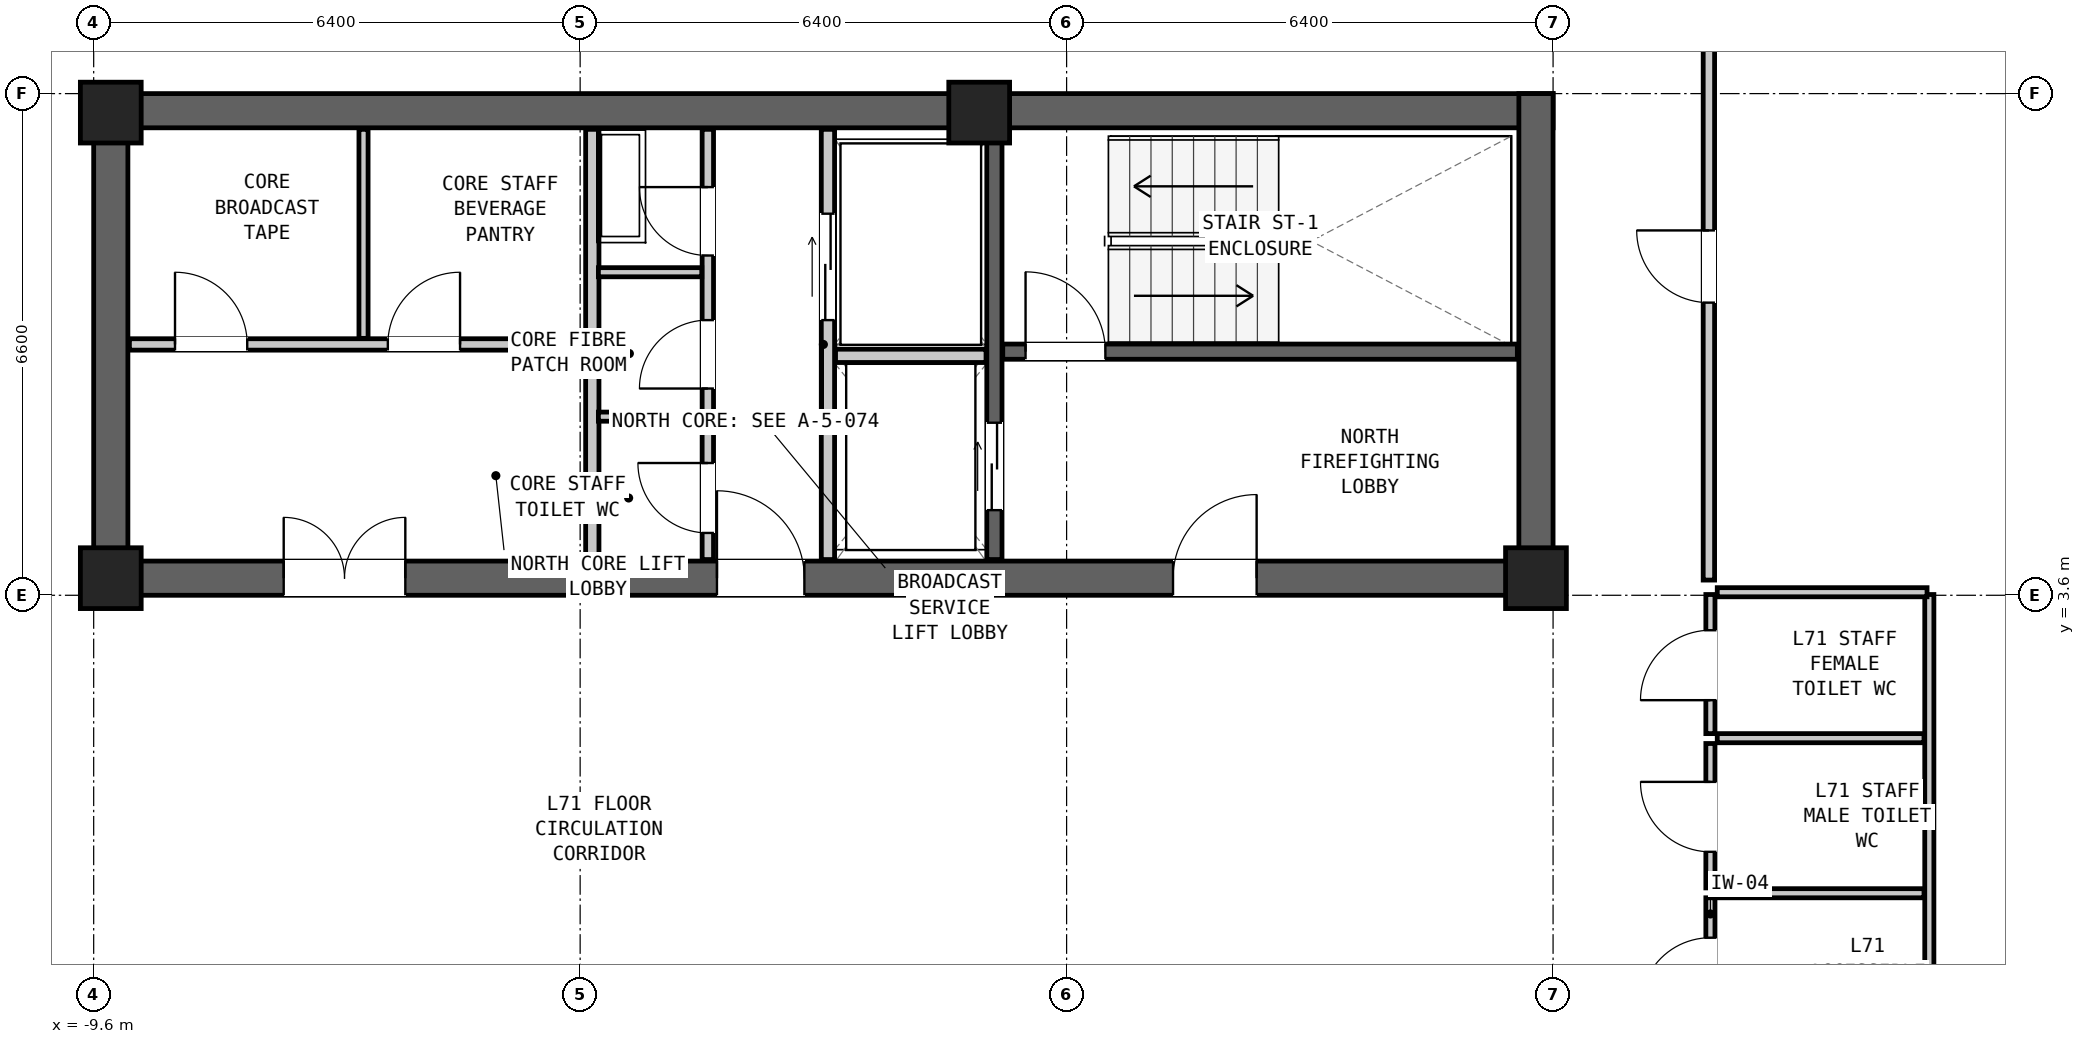
"""IFC4 building model, lengths in metres.
Left out: names, types, materials, properties, quantities, classifications, styles, units other than length and angle.
Written with IfcOpenShell. Run it as: python <this file> out.ifc"""

import sys

from ifc_helpers import new_model, si_unit, direction, frame, frame_2d, origin, origin_2d, place, context, subcontext, project, spatial, rectangle, extrude, element, fill, save


model = new_model("IFC4")
c1 = context("Model", 3, precision=1e-05, world=origin(), true_north=direction((0.0, 1.0)))
c2 = subcontext(c1, "Body", "Model", "MODEL_VIEW")
j1 = project(units=[si_unit("LENGTHUNIT", "METRE"), si_unit("PLANEANGLEUNIT", "RADIAN")], contexts=[c1])
p1 = place(None, origin())
s1 = spatial("IfcSite", under=j1, at=p1, CompositionType="ELEMENT")
p2 = place(p1, origin())
s2 = spatial("IfcBuilding", under=s1, at=p2, CompositionType="ELEMENT")
p3 = place(p2, frame((0.0, 0.0, 242.85)))
s3 = spatial("IfcBuildingStorey", under=s2, at=p3, CompositionType="ELEMENT", Elevation=242.85)
p4 = place(p3, frame((-9.6, 9.975, 0.0), z_axis=(0.0, 0.0, 1.0), x_axis=(1.0, 0.0, 0.0)))
e1 = element("IfcWall", 1, at=p4, inside=s3, PredefinedType="SHEAR", context=c2, shape_type="SweptSolid", body=[
    extrude(rectangle(XDim=19.2, YDim=0.45, at=frame_2d((9.6, 0.0))), origin(), (0.0, 0.0, 1.0), 3.05),
])
p5 = place(p3, frame((-9.6, 3.825, 0.0), z_axis=(0.0, 0.0, 1.0), x_axis=(1.0, 0.0, 0.0)))
e2 = element("IfcWall", 2, at=p5, inside=s3, PredefinedType="SHEAR", context=c2, shape_type="SweptSolid", body=[
    extrude(rectangle(XDim=19.2, YDim=0.45, at=frame_2d((9.6, 0.0))), origin(), (0.0, 0.0, 1.0), 3.05),
])
p6 = place(p5, frame((14.2, 0.0, 0.0)))
e3 = element("IfcOpeningElement", 3, at=p6, cuts=e2, PredefinedType="OPENING", context=c2, shape_type="SweptSolid", body=[
    extrude(rectangle(XDim=1.1, YDim=2.08, at=frame_2d((0.55, 1.04))), frame((0.0, 0.237, 0.0), z_axis=(0.0, -1.0, 0.0), x_axis=(1.0, 0.0, 0.0)), (0.0, 0.0, 1.0), 0.474),
])
p7 = place(p5, frame((8.2, 0.0, 0.0)))
e4 = element("IfcOpeningElement", 4, at=p7, cuts=e2, PredefinedType="OPENING", context=c2, shape_type="SweptSolid", body=[
    extrude(rectangle(XDim=1.15, YDim=2.1, at=frame_2d((0.575, 1.05))), frame((0.0, 0.237, 0.0), z_axis=(0.0, -1.0, 0.0), x_axis=(1.0, 0.0, 0.0)), (0.0, 0.0, 1.0), 0.474),
])
p8 = place(p5, frame((2.5, 0.0, 0.0)))
e5 = element("IfcOpeningElement", 5, at=p8, cuts=e2, PredefinedType="OPENING", context=c2, shape_type="SweptSolid", body=[
    extrude(rectangle(XDim=1.6, YDim=2.12, at=frame_2d((0.8, 1.06))), frame((0.0, 0.237, 0.0), z_axis=(0.0, -1.0, 0.0), x_axis=(1.0, 0.0, 0.0)), (0.0, 0.0, 1.0), 0.474),
])
for number, where, z_axis, x_axis in (
    (6, (-9.375, 3.6, 0.0), (0.0, 0.0, 1.0), (0.0, 1.0, 0.0)),
    (7, (9.375, 3.6, 0.0), (0.0, 0.0, 1.0), (0.0, 1.0, 0.0)),
):
    element("IfcWall", number, at=place(p3, frame(where, z_axis=z_axis, x_axis=x_axis)), inside=s3, PredefinedType="SHEAR", context=c2, shape_type="SweptSolid", body=[
        extrude(rectangle(XDim=6.6, YDim=0.45, at=frame_2d((3.3, 0.0))), origin(), (0.0, 0.0, 1.0), 3.05),
    ])
for number, where, z_axis, x_axis in (
    (8, (-9.375, 9.95, 0.0), (0.0, 0.0, 1.0), (1.0, 0.0, 0.0)),
    (9, (2.05, 9.95, 0.0), (0.0, 0.0, 1.0), (1.0, 0.0, 0.0)),
    (10, (-9.375, 3.825, 0.0), (0.0, 0.0, 1.0), (1.0, 0.0, 0.0)),
    (11, (9.375, 3.825, 0.0), (0.0, 0.0, 1.0), (1.0, 0.0, 0.0)),
):
    element("IfcColumn", number, at=place(p3, frame(where, z_axis=z_axis, x_axis=x_axis)), inside=s3, PredefinedType="COLUMN", context=c2, shape_type="SweptSolid", body=[
        extrude(rectangle(XDim=0.8, YDim=0.8, at=origin_2d()), origin(), (0.0, 0.0, 1.0), 3.05),
    ])
p9 = place(p3, frame((2.36, 6.805, 0.0), z_axis=(0.0, 0.0, 1.0), x_axis=(1.0, 0.0, 0.0)))
e12 = element("IfcWall", 12, at=p9, inside=s3, PredefinedType="SHEAR", context=c2, shape_type="SweptSolid", body=[
    extrude(rectangle(XDim=6.77, YDim=0.2, at=frame_2d((3.385, 0.0))), origin(), (0.0, 0.0, 1.0), 2.86),
])
p10 = place(p9, frame((0.3, 0.0, 0.0)))
e13 = element("IfcOpeningElement", 13, at=p10, cuts=e12, PredefinedType="OPENING", context=c2, shape_type="SweptSolid", body=[
    extrude(rectangle(XDim=1.05, YDim=2.08, at=frame_2d((0.525, 1.04))), frame((0.0, 0.112, 0.0), z_axis=(0.0, -1.0, 0.0), x_axis=(1.0, 0.0, 0.0)), (0.0, 0.0, 1.0), 0.224),
])
p11 = place(p3, frame((2.25, 4.07, 0.0), z_axis=(0.0, 0.0, 1.0), x_axis=(0.0, 1.0, 0.0)))
e14 = element("IfcWall", 14, at=p11, inside=s3, PredefinedType="SHEAR", context=c2, shape_type="SweptSolid", body=[
    extrude(rectangle(XDim=5.66, YDim=0.2, at=frame_2d((2.83, 0.0))), origin(), (0.0, 0.0, 1.0), 2.86),
])
p12 = place(p11, frame((0.65, 0.0, 0.0)))
e15 = element("IfcOpeningElement", 15, at=p12, cuts=e14, PredefinedType="OPENING", context=c2, shape_type="SweptSolid", body=[
    extrude(rectangle(XDim=1.15, YDim=2.08, at=frame_2d((0.575, 1.04))), frame((0.0, 0.112, 0.0), z_axis=(0.0, -1.0, 0.0), x_axis=(1.0, 0.0, 0.0)), (0.0, 0.0, 1.0), 0.224),
])
p13 = place(p3, frame((0.06, 4.07, 0.0), z_axis=(0.0, 0.0, 1.0), x_axis=(0.0, 1.0, 0.0)))
e16 = element("IfcWall", 16, at=p13, inside=s3, PredefinedType="PARTITIONING", context=c2, shape_type="SweptSolid", body=[
    extrude(rectangle(XDim=5.66, YDim=0.175, at=frame_2d((2.83, 0.0))), origin(), (0.0, 0.0, 1.0), 2.86),
])
p14 = place(p13, frame((3.15, 0.0, 0.0)))
e17 = element("IfcOpeningElement", 17, at=p14, cuts=e16, PredefinedType="OPENING", context=c2, shape_type="SweptSolid", body=[
    extrude(rectangle(XDim=1.4, YDim=2.12, at=frame_2d((0.7, 1.06))), frame((0.0, 0.1, 0.0), z_axis=(0.0, -1.0, 0.0), x_axis=(1.0, 0.0, 0.0)), (0.0, 0.0, 1.0), 0.199),
])
p15 = place(p3, frame((0.16, 6.75, 0.0), z_axis=(0.0, 0.0, 1.0), x_axis=(1.0, 0.0, 0.0)))
e18 = element("IfcWall", 18, at=p15, inside=s3, PredefinedType="PARTITIONING", context=c2, shape_type="SweptSolid", body=[
    extrude(rectangle(XDim=1.98, YDim=0.175, at=frame_2d((0.99, 0.0))), origin(), (0.0, 0.0, 1.0), 2.86),
])
p16 = place(p3, frame((-3.04, 4.07, 0.0), z_axis=(0.0, 0.0, 1.0), x_axis=(0.0, 1.0, 0.0)))
e19 = element("IfcWall", 19, at=p16, inside=s3, PredefinedType="PARTITIONING", context=c2, shape_type="SweptSolid", body=[
    extrude(rectangle(XDim=5.66, YDim=0.175, at=frame_2d((2.83, 0.0))), origin(), (0.0, 0.0, 1.0), 2.86),
])
p17 = place(p3, frame((-1.52, 4.07, 0.0), z_axis=(0.0, 0.0, 1.0), x_axis=(0.0, 1.0, 0.0)))
e20 = element("IfcWall", 20, at=p17, inside=s3, PredefinedType="PARTITIONING", context=c2, shape_type="SweptSolid", body=[
    extrude(rectangle(XDim=5.66, YDim=0.15, at=frame_2d((2.83, 0.0))), origin(), (0.0, 0.0, 1.0), 2.86),
])
p18 = place(p17, frame((4.0, 0.0, 0.0)))
e21 = element("IfcOpeningElement", 21, at=p18, cuts=e20, PredefinedType="OPENING", context=c2, shape_type="SweptSolid", body=[
    extrude(rectangle(XDim=0.9, YDim=2.05, at=frame_2d((0.45, 1.025))), frame((0.0, 0.087, 0.0), z_axis=(0.0, -1.0, 0.0), x_axis=(1.0, 0.0, 0.0)), (0.0, 0.0, 1.0), 0.174),
])
p19 = place(p17, frame((2.25, 0.0, 0.0)))
e22 = element("IfcOpeningElement", 22, at=p19, cuts=e20, PredefinedType="OPENING", context=c2, shape_type="SweptSolid", body=[
    extrude(rectangle(XDim=0.9, YDim=2.05, at=frame_2d((0.45, 1.025))), frame((0.0, 0.087, 0.0), z_axis=(0.0, -1.0, 0.0), x_axis=(1.0, 0.0, 0.0)), (0.0, 0.0, 1.0), 0.174),
])
p20 = place(p17, frame((0.35, 0.0, 0.0)))
e23 = element("IfcOpeningElement", 23, at=p20, cuts=e20, PredefinedType="OPENING", context=c2, shape_type="SweptSolid", body=[
    extrude(rectangle(XDim=0.92, YDim=2.1, at=frame_2d((0.46, 1.05))), frame((0.0, 0.087, 0.0), z_axis=(0.0, -1.0, 0.0), x_axis=(1.0, 0.0, 0.0)), (0.0, 0.0, 1.0), 0.174),
])
for number, where, z_axis, x_axis in (
    (24, (-2.96, 5.95, 0.0), (0.0, 0.0, 1.0), (1.0, 0.0, 0.0)),
    (25, (-2.96, 7.85, 0.0), (0.0, 0.0, 1.0), (1.0, 0.0, 0.0)),
):
    element("IfcWall", number, at=place(p3, frame(where, z_axis=z_axis, x_axis=x_axis)), inside=s3, PredefinedType="PARTITIONING", context=c2, shape_type="SweptSolid", body=[
        extrude(rectangle(XDim=1.36, YDim=0.12, at=frame_2d((0.68, 0.0))), origin(), (0.0, 0.0, 1.0), 2.86),
    ])
p21 = place(p3, frame((-9.13, 6.9, 0.0), z_axis=(0.0, 0.0, 1.0), x_axis=(1.0, 0.0, 0.0)))
e26 = element("IfcWall", 26, at=p21, inside=s3, PredefinedType="PARTITIONING", context=c2, shape_type="SweptSolid", body=[
    extrude(rectangle(XDim=6.01, YDim=0.15, at=frame_2d((3.005, 0.0))), origin(), (0.0, 0.0, 1.0), 2.86),
])
p22 = place(p21, frame((0.6, 0.0, 0.0)))
e27 = element("IfcOpeningElement", 27, at=p22, cuts=e26, PredefinedType="OPENING", context=c2, shape_type="SweptSolid", body=[
    extrude(rectangle(XDim=0.95, YDim=2.1, at=frame_2d((0.475, 1.05))), frame((0.0, 0.087, 0.0), z_axis=(0.0, -1.0, 0.0), x_axis=(1.0, 0.0, 0.0)), (0.0, 0.0, 1.0), 0.174),
])
p23 = place(p21, frame((3.4, 0.0, 0.0)))
e28 = element("IfcOpeningElement", 28, at=p23, cuts=e26, PredefinedType="OPENING", context=c2, shape_type="SweptSolid", body=[
    extrude(rectangle(XDim=0.95, YDim=2.1, at=frame_2d((0.475, 1.05))), frame((0.0, 0.087, 0.0), z_axis=(0.0, -1.0, 0.0), x_axis=(1.0, 0.0, 0.0)), (0.0, 0.0, 1.0), 0.174),
])
p24 = place(p3, frame((-6.05, 6.98, 0.0), z_axis=(0.0, 0.0, 1.0), x_axis=(0.0, 1.0, 0.0)))
e29 = element("IfcWall", 29, at=p24, inside=s3, PredefinedType="PARTITIONING", context=c2, shape_type="SweptSolid", body=[
    extrude(rectangle(XDim=2.75, YDim=0.12, at=frame_2d((1.375, 0.0))), origin(), (0.0, 0.0, 1.0), 2.86),
])
p25 = place(p3, frame((11.67, -2.32, 0.0), z_axis=(0.0, 0.0, 1.0), x_axis=(0.0, 1.0, 0.0)))
e30 = element("IfcWall", 30, at=p25, inside=s3, PredefinedType="PARTITIONING", context=c2, shape_type="SweptSolid", body=[
    extrude(rectangle(XDim=1.94, YDim=0.12, at=frame_2d((0.97, 0.0))), origin(), (0.0, 0.0, 1.0), 2.86),
])
p26 = place(p25, frame((0.495, 0.0, 0.0)))
e31 = element("IfcOpeningElement", 31, at=p26, cuts=e30, PredefinedType="OPENING", context=c2, shape_type="SweptSolid", body=[
    extrude(rectangle(XDim=0.92, YDim=2.1, at=frame_2d((0.46, 1.05))), frame((0.0, 0.072, 0.0), z_axis=(0.0, -1.0, 0.0), x_axis=(1.0, 0.0, 0.0)), (0.0, 0.0, 1.0), 0.144),
])
p27 = place(p3, frame((11.67, -0.25, 0.0), z_axis=(0.0, 0.0, 1.0), x_axis=(0.0, 1.0, 0.0)))
e32 = element("IfcWall", 32, at=p27, inside=s3, PredefinedType="PARTITIONING", context=c2, shape_type="SweptSolid", body=[
    extrude(rectangle(XDim=1.9, YDim=0.12, at=frame_2d((0.95, 0.0))), origin(), (0.0, 0.0, 1.0), 2.86),
])
p28 = place(p27, frame((0.475, 0.0, 0.0)))
e33 = element("IfcOpeningElement", 33, at=p28, cuts=e32, PredefinedType="OPENING", context=c2, shape_type="SweptSolid", body=[
    extrude(rectangle(XDim=0.92, YDim=2.1, at=frame_2d((0.46, 1.05))), frame((0.0, 0.072, 0.0), z_axis=(0.0, -1.0, 0.0), x_axis=(1.0, 0.0, 0.0)), (0.0, 0.0, 1.0), 0.144),
])
p29 = place(p3, frame((11.67, 1.78, 0.0), z_axis=(0.0, 0.0, 1.0), x_axis=(0.0, 1.0, 0.0)))
e34 = element("IfcWall", 34, at=p29, inside=s3, PredefinedType="PARTITIONING", context=c2, shape_type="SweptSolid", body=[
    extrude(rectangle(XDim=1.83, YDim=0.12, at=frame_2d((0.915, 0.0))), origin(), (0.0, 0.0, 1.0), 2.86),
])
p30 = place(p29, frame((0.44, 0.0, 0.0)))
e35 = element("IfcOpeningElement", 35, at=p30, cuts=e34, PredefinedType="OPENING", context=c2, shape_type="SweptSolid", body=[
    extrude(rectangle(XDim=0.92, YDim=2.1, at=frame_2d((0.46, 1.05))), frame((0.0, 0.072, 0.0), z_axis=(0.0, -1.0, 0.0), x_axis=(1.0, 0.0, 0.0)), (0.0, 0.0, 1.0), 0.144),
])
p31 = place(p3, frame((14.55, -2.32, 0.0), z_axis=(0.0, 0.0, 1.0), x_axis=(0.0, 1.0, 0.0)))
e36 = element("IfcWall", 36, at=p31, inside=s3, PredefinedType="PARTITIONING", context=c2, shape_type="SweptSolid", body=[
    extrude(rectangle(XDim=5.93, YDim=0.12, at=frame_2d((2.965, 0.0))), origin(), (0.0, 0.0, 1.0), 2.86),
])
p32 = place(p3, frame((11.76, 3.64, 0.0), z_axis=(0.0, 0.0, 1.0), x_axis=(1.0, 0.0, 0.0)))
e37 = element("IfcWall", 37, at=p32, inside=s3, PredefinedType="PARTITIONING", context=c2, shape_type="SweptSolid", body=[
    extrude(rectangle(XDim=2.76, YDim=0.12, at=frame_2d((1.38, 0.0))), origin(), (0.0, 0.0, 1.0), 1.722),
])
for number, where, z_axis, x_axis in (
    (38, (11.76, -0.32, 0.0), (0.0, 0.0, 1.0), (1.0, 0.0, 0.0)),
    (39, (11.76, 1.72, 0.0), (0.0, 0.0, 1.0), (1.0, 0.0, 0.0)),
):
    element("IfcWall", number, at=place(p3, frame(where, z_axis=z_axis, x_axis=x_axis)), inside=s3, PredefinedType="PARTITIONING", context=c2, shape_type="SweptSolid", body=[
        extrude(rectangle(XDim=2.72, YDim=0.12, at=frame_2d((1.36, 0.0))), origin(), (0.0, 0.0, 1.0), 2.86),
    ])
p33 = place(p3, frame((11.65, 3.8, 0.0), z_axis=(0.0, 0.0, 1.0), x_axis=(0.0, 1.0, 0.0)))
e40 = element("IfcWall", 40, at=p33, inside=s3, PredefinedType="PARTITIONING", context=c2, shape_type="SweptSolid", body=[
    extrude(rectangle(XDim=8.25, YDim=0.15, at=frame_2d((4.125, 0.0))), origin(), (0.0, 0.0, 1.0), 2.86),
])
p34 = place(p33, frame((3.65, 0.0, 0.0)))
e41 = element("IfcOpeningElement", 41, at=p34, cuts=e40, PredefinedType="OPENING", context=c2, shape_type="SweptSolid", body=[
    extrude(rectangle(XDim=0.95, YDim=2.1, at=frame_2d((0.475, 1.05))), frame((0.0, 0.087, 0.0), z_axis=(0.0, -1.0, 0.0), x_axis=(1.0, 0.0, 0.0)), (0.0, 0.0, 1.0), 0.174),
])
p35 = place(p10, origin())
e42 = element("IfcDoor", 42, at=p35, inside=s3, OperationType="SINGLE_SWING_LEFT", PredefinedType="DOOR", context=c2, shape_type="SweptSolid", body=[
    extrude(rectangle(XDim=1.05, YDim=2.08, at=frame_2d((0.525, 1.04))), frame((0.0, 0.025, 0.0), z_axis=(0.0, -1.0, 0.0), x_axis=(1.0, 0.0, 0.0)), (0.0, 0.0, 1.0), 0.05),
])
fill(e13, e42)
p36 = place(p6, origin())
e43 = element("IfcDoor", 43, at=p36, inside=s3, OperationType="SINGLE_SWING_RIGHT", PredefinedType="DOOR", context=c2, shape_type="SweptSolid", body=[
    extrude(rectangle(XDim=1.1, YDim=2.08, at=frame_2d((0.55, 1.04))), frame((0.0, 0.025, 0.0), z_axis=(0.0, -1.0, 0.0), x_axis=(1.0, 0.0, 0.0)), (0.0, 0.0, 1.0), 0.05),
])
fill(e3, e43)
p37 = place(p12, origin())
e44 = element("IfcDoor", 44, at=p37, inside=s3, OperationType="DOUBLE_DOOR_SLIDING", PredefinedType="DOOR", context=c2, shape_type="SweptSolid", body=[
    extrude(rectangle(XDim=1.15, YDim=2.08, at=frame_2d((0.575, 1.04))), frame((0.0, 0.025, 0.0), z_axis=(0.0, -1.0, 0.0), x_axis=(1.0, 0.0, 0.0)), (0.0, 0.0, 1.0), 0.05),
])
fill(e15, e44)
p38 = place(p14, origin())
e45 = element("IfcDoor", 45, at=p38, inside=s3, OperationType="DOUBLE_DOOR_SLIDING", PredefinedType="DOOR", context=c2, shape_type="SweptSolid", body=[
    extrude(rectangle(XDim=1.4, YDim=2.12, at=frame_2d((0.7, 1.06))), frame((0.0, 0.025, 0.0), z_axis=(0.0, -1.0, 0.0), x_axis=(1.0, 0.0, 0.0)), (0.0, 0.0, 1.0), 0.05),
])
fill(e17, e45)
p39 = place(p7, origin())
e46 = element("IfcDoor", 46, at=p39, inside=s3, OperationType="SINGLE_SWING_LEFT", PredefinedType="DOOR", context=c2, shape_type="SweptSolid", body=[
    extrude(rectangle(XDim=1.15, YDim=2.1, at=frame_2d((0.575, 1.05))), frame((0.0, 0.025, 0.0), z_axis=(0.0, -1.0, 0.0), x_axis=(1.0, 0.0, 0.0)), (0.0, 0.0, 1.0), 0.05),
])
fill(e4, e46)
p40 = place(p18, origin())
e47 = element("IfcDoor", 47, at=p40, inside=s3, OperationType="SINGLE_SWING_RIGHT", PredefinedType="DOOR", context=c2, shape_type="SweptSolid", body=[
    extrude(rectangle(XDim=0.9, YDim=2.05, at=frame_2d((0.45, 1.025))), frame((0.0, 0.025, 0.0), z_axis=(0.0, -1.0, 0.0), x_axis=(1.0, 0.0, 0.0)), (0.0, 0.0, 1.0), 0.05),
])
fill(e21, e47)
p41 = place(p19, origin())
e48 = element("IfcDoor", 48, at=p41, inside=s3, OperationType="SINGLE_SWING_LEFT", PredefinedType="DOOR", context=c2, shape_type="SweptSolid", body=[
    extrude(rectangle(XDim=0.9, YDim=2.05, at=frame_2d((0.45, 1.025))), frame((0.0, 0.025, 0.0), z_axis=(0.0, -1.0, 0.0), x_axis=(1.0, 0.0, 0.0)), (0.0, 0.0, 1.0), 0.05),
])
fill(e22, e48)
p42 = place(p20, origin())
e49 = element("IfcDoor", 49, at=p42, inside=s3, OperationType="SINGLE_SWING_RIGHT", PredefinedType="DOOR", context=c2, shape_type="SweptSolid", body=[
    extrude(rectangle(XDim=0.92, YDim=2.1, at=frame_2d((0.46, 1.05))), frame((0.0, 0.025, 0.0), z_axis=(0.0, -1.0, 0.0), x_axis=(1.0, 0.0, 0.0)), (0.0, 0.0, 1.0), 0.05),
])
fill(e23, e49)
p43 = place(p8, origin())
e50 = element("IfcDoor", 50, at=p43, inside=s3, OperationType="DOUBLE_DOOR_SINGLE_SWING", PredefinedType="DOOR", context=c2, shape_type="SweptSolid", body=[
    extrude(rectangle(XDim=1.6, YDim=2.12, at=frame_2d((0.8, 1.06))), frame((0.0, 0.025, 0.0), z_axis=(0.0, -1.0, 0.0), x_axis=(1.0, 0.0, 0.0)), (0.0, 0.0, 1.0), 0.05),
])
fill(e5, e50)
p44 = place(p22, origin())
e51 = element("IfcDoor", 51, at=p44, inside=s3, OperationType="SINGLE_SWING_LEFT", PredefinedType="DOOR", context=c2, shape_type="SweptSolid", body=[
    extrude(rectangle(XDim=0.95, YDim=2.1, at=frame_2d((0.475, 1.05))), frame((0.0, 0.025, 0.0), z_axis=(0.0, -1.0, 0.0), x_axis=(1.0, 0.0, 0.0)), (0.0, 0.0, 1.0), 0.05),
])
fill(e27, e51)
p45 = place(p23, origin())
e52 = element("IfcDoor", 52, at=p45, inside=s3, OperationType="SINGLE_SWING_RIGHT", PredefinedType="DOOR", context=c2, shape_type="SweptSolid", body=[
    extrude(rectangle(XDim=0.95, YDim=2.1, at=frame_2d((0.475, 1.05))), frame((0.0, 0.025, 0.0), z_axis=(0.0, -1.0, 0.0), x_axis=(1.0, 0.0, 0.0)), (0.0, 0.0, 1.0), 0.05),
])
fill(e28, e52)
p46 = place(p26, origin())
e53 = element("IfcDoor", 53, at=p46, inside=s3, OperationType="SINGLE_SWING_LEFT", PredefinedType="DOOR", context=c2, shape_type="SweptSolid", body=[
    extrude(rectangle(XDim=0.92, YDim=2.1, at=frame_2d((0.46, 1.05))), frame((0.0, 0.025, 0.0), z_axis=(0.0, -1.0, 0.0), x_axis=(1.0, 0.0, 0.0)), (0.0, 0.0, 1.0), 0.05),
])
fill(e31, e53)
p47 = place(p28, origin())
e54 = element("IfcDoor", 54, at=p47, inside=s3, OperationType="SINGLE_SWING_RIGHT", PredefinedType="DOOR", context=c2, shape_type="SweptSolid", body=[
    extrude(rectangle(XDim=0.92, YDim=2.1, at=frame_2d((0.46, 1.05))), frame((0.0, 0.025, 0.0), z_axis=(0.0, -1.0, 0.0), x_axis=(1.0, 0.0, 0.0)), (0.0, 0.0, 1.0), 0.05),
])
fill(e33, e54)
p48 = place(p30, origin())
e55 = element("IfcDoor", 55, at=p48, inside=s3, OperationType="SINGLE_SWING_LEFT", PredefinedType="DOOR", context=c2, shape_type="SweptSolid", body=[
    extrude(rectangle(XDim=0.92, YDim=2.1, at=frame_2d((0.46, 1.05))), frame((0.0, 0.025, 0.0), z_axis=(0.0, -1.0, 0.0), x_axis=(1.0, 0.0, 0.0)), (0.0, 0.0, 1.0), 0.05),
])
fill(e35, e55)
p49 = place(p34, origin())
e56 = element("IfcDoor", 56, at=p49, inside=s3, OperationType="SINGLE_SWING_RIGHT", PredefinedType="DOOR", context=c2, shape_type="SweptSolid", body=[
    extrude(rectangle(XDim=0.95, YDim=2.1, at=frame_2d((0.475, 1.05))), frame((0.0, 0.025, 0.0), z_axis=(0.0, -1.0, 0.0), x_axis=(1.0, 0.0, 0.0)), (0.0, 0.0, 1.0), 0.05),
])
fill(e41, e56)
save(model, sys.argv[1])
